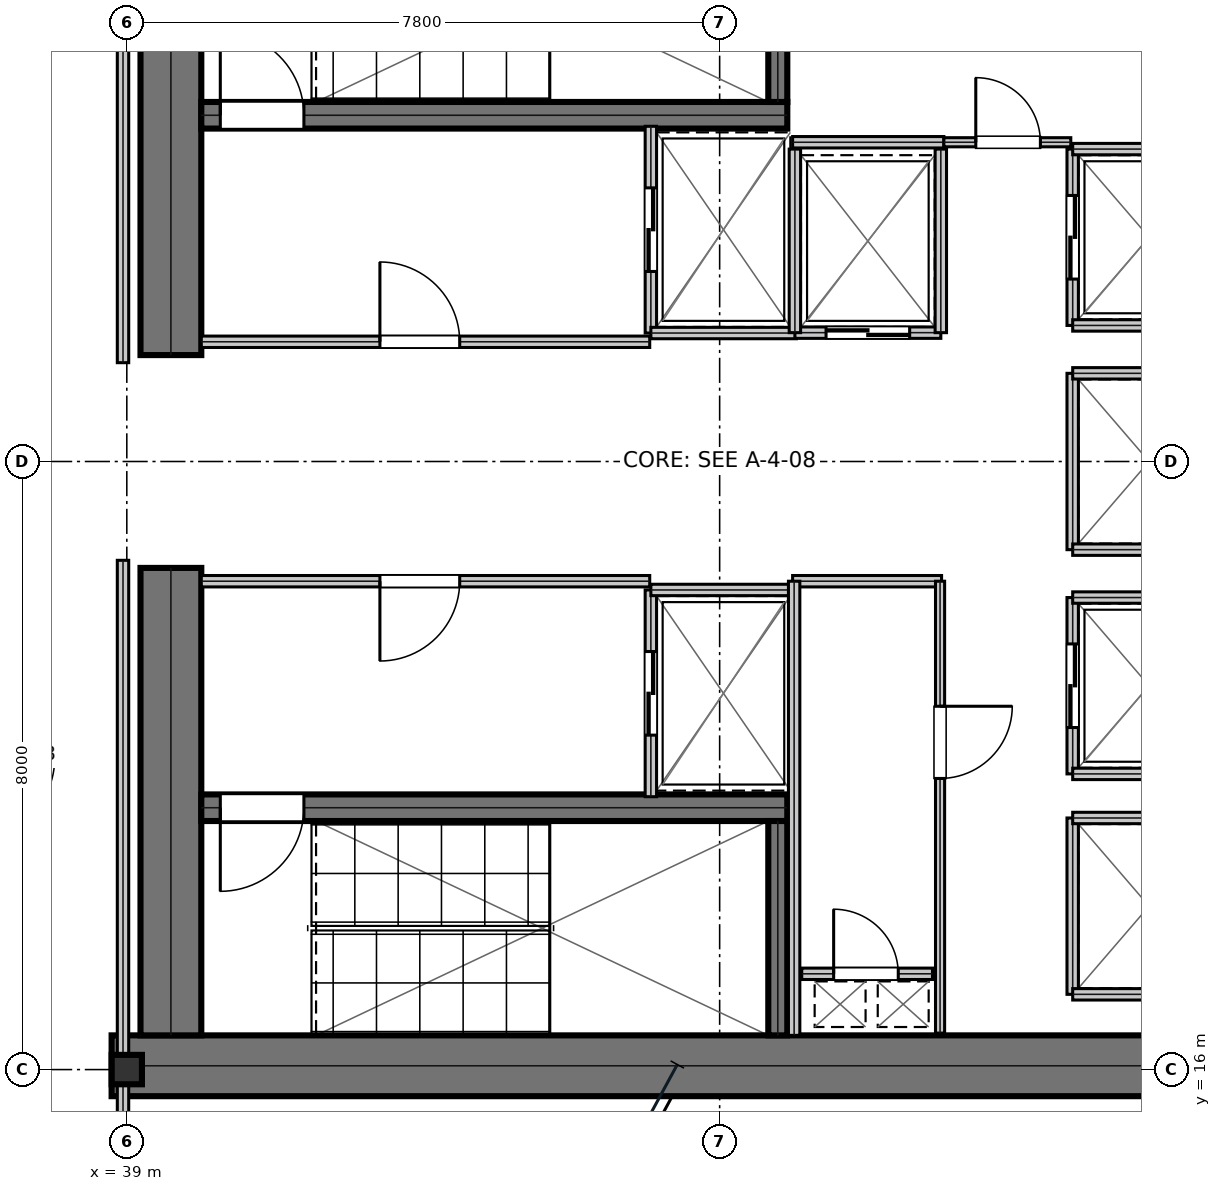
"""IFC4 building model, lengths in metres.
Left out: names, types, materials, properties, quantities, classifications, styles, units other than length and angle.
Written with IfcOpenShell. Run it as: python <this file> out.ifc"""

import sys

from ifc_helpers import new_model, si_unit, direction, frame, frame_2d, origin, origin_2d, place, context, subcontext, project, spatial, rectangle, i_section, extrude, element, fill, save


model = new_model("IFC4")
c1 = context("Model", 3, precision=1e-05, world=origin(), true_north=direction((0.0, 1.0)))
c2 = subcontext(c1, "Body", "Model", "MODEL_VIEW")
j1 = project(units=[si_unit("LENGTHUNIT", "METRE"), si_unit("PLANEANGLEUNIT", "RADIAN")], contexts=[c1])
p1 = place(None, origin())
s1 = spatial("IfcSite", under=j1, at=p1, CompositionType="ELEMENT")
p2 = place(p1, origin())
s2 = spatial("IfcBuilding", under=s1, at=p2, CompositionType="ELEMENT")
p3 = place(p2, frame((0.0, 0.0, 157.35)))
s3 = spatial("IfcBuildingStorey", under=s2, at=p3, CompositionType="ELEMENT", Elevation=157.35)
p4 = place(p3, frame((38.8, 16.05, 0.0), z_axis=(0.0, 0.0, 1.0), x_axis=(1.0, 0.0, 0.0)))
e1 = element("IfcWall", 1, at=p4, inside=s3, PredefinedType="SHEAR", context=c2, shape_type="SweptSolid", body=[
    extrude(rectangle(XDim=16.0, YDim=0.8, at=frame_2d((8.0, 0.0))), origin(), (0.0, 0.0, 1.0), 3.81),
])
for number, where, z_axis, x_axis in (
    (2, (39.58, 16.45, 0.0), (0.0, 0.0, 1.0), (0.0, 1.0, 0.0)),
    (3, (39.58, 25.4, 0.0), (0.0, 0.0, 1.0), (0.0, 1.0, 0.0)),
):
    element("IfcWall", number, at=place(p3, frame(where, z_axis=z_axis, x_axis=x_axis)), inside=s3, PredefinedType="SHEAR", context=c2, shape_type="SweptSolid", body=[
        extrude(rectangle(XDim=6.15, YDim=0.8, at=frame_2d((3.075, 0.0))), origin(), (0.0, 0.0, 1.0), 3.81),
    ])
p5 = place(p3, frame((39.98, 28.555, 0.0), z_axis=(0.0, 0.0, 1.0), x_axis=(1.0, 0.0, 0.0)))
e4 = element("IfcWall", 4, at=p5, inside=s3, PredefinedType="SHEAR", context=c2, shape_type="SweptSolid", body=[
    extrude(rectangle(XDim=7.71, YDim=0.35, at=frame_2d((3.855, 0.0))), origin(), (0.0, 0.0, 1.0), 3.81),
])
p6 = place(p5, frame((0.25, 0.0, 0.0)))
e5 = element("IfcOpeningElement", 5, at=p6, cuts=e4, PredefinedType="OPENING", context=c2, shape_type="SweptSolid", body=[
    extrude(rectangle(XDim=1.1, YDim=2.15, at=frame_2d((0.55, 1.075))), frame((0.0, 0.185, 0.0), z_axis=(0.0, -1.0, 0.0), x_axis=(1.0, 0.0, 0.0)), (0.0, 0.0, 1.0), 0.37),
])
p7 = place(p3, frame((39.98, 19.445, 0.0), z_axis=(0.0, 0.0, 1.0), x_axis=(1.0, 0.0, 0.0)))
e6 = element("IfcWall", 6, at=p7, inside=s3, PredefinedType="SHEAR", context=c2, shape_type="SweptSolid", body=[
    extrude(rectangle(XDim=7.71, YDim=0.35, at=frame_2d((3.855, 0.0))), origin(), (0.0, 0.0, 1.0), 3.81),
])
p8 = place(p7, frame((0.25, 0.0, 0.0)))
e7 = element("IfcOpeningElement", 7, at=p8, cuts=e6, PredefinedType="OPENING", context=c2, shape_type="SweptSolid", body=[
    extrude(rectangle(XDim=1.1, YDim=2.15, at=frame_2d((0.55, 1.075))), frame((0.0, 0.185, 0.0), z_axis=(0.0, -1.0, 0.0), x_axis=(1.0, 0.0, 0.0)), (0.0, 0.0, 1.0), 0.37),
])
for number, where, z_axis, x_axis in (
    (8, (47.565, 28.73, 0.0), (0.0, 0.0, 1.0), (0.0, 1.0, 0.0)),
    (9, (47.565, 16.45, 0.0), (0.0, 0.0, 1.0), (0.0, 1.0, 0.0)),
):
    element("IfcWall", number, at=place(p3, frame(where, z_axis=z_axis, x_axis=x_axis)), inside=s3, PredefinedType="SHEAR", context=c2, shape_type="SweptSolid", body=[
        extrude(rectangle(XDim=2.82, YDim=0.25, at=frame_2d((1.41, 0.0))), origin(), (0.0, 0.0, 1.0), 3.81),
    ])
p9 = place(p3, frame((39.0, 16.0, 0.0), z_axis=(0.0, 0.0, 1.0), x_axis=(1.0, 0.0, 0.0)))
e10 = element("IfcColumn", 10, at=p9, inside=s3, PredefinedType="COLUMN", context=c2, shape_type="SweptSolid", body=[
    extrude(i_section(OverallWidth=0.398, OverallDepth=0.387, WebThickness=0.021, FlangeThickness=0.033, at=origin_2d()), origin(), (0.0, 0.0, 1.0), 4.044),
])
p10 = place(p3, frame((39.98, 25.575, 0.0), z_axis=(0.0, 0.0, 1.0), x_axis=(1.0, 0.0, 0.0)))
e11 = element("IfcWall", 11, at=p10, inside=s3, PredefinedType="PARTITIONING", context=c2, shape_type="SweptSolid", body=[
    extrude(rectangle(XDim=5.9, YDim=0.15, at=frame_2d((2.95, 0.0))), origin(), (0.0, 0.0, 1.0), 3.81),
])
p11 = place(p10, frame((2.35, 0.0, 0.0)))
e12 = element("IfcOpeningElement", 12, at=p11, cuts=e11, PredefinedType="OPENING", context=c2, shape_type="SweptSolid", body=[
    extrude(rectangle(XDim=1.05, YDim=2.15, at=frame_2d((0.525, 1.075))), frame((0.0, 0.085, 0.0), z_axis=(0.0, -1.0, 0.0), x_axis=(1.0, 0.0, 0.0)), (0.0, 0.0, 1.0), 0.17),
])
p12 = place(p3, frame((39.98, 22.425, 0.0), z_axis=(0.0, 0.0, 1.0), x_axis=(1.0, 0.0, 0.0)))
e13 = element("IfcWall", 13, at=p12, inside=s3, PredefinedType="PARTITIONING", context=c2, shape_type="SweptSolid", body=[
    extrude(rectangle(XDim=5.9, YDim=0.15, at=frame_2d((2.95, 0.0))), origin(), (0.0, 0.0, 1.0), 3.81),
])
p13 = place(p12, frame((2.35, 0.0, 0.0)))
e14 = element("IfcOpeningElement", 14, at=p13, cuts=e13, PredefinedType="OPENING", context=c2, shape_type="SweptSolid", body=[
    extrude(rectangle(XDim=1.05, YDim=2.15, at=frame_2d((0.525, 1.075))), frame((0.0, 0.085, 0.0), z_axis=(0.0, -1.0, 0.0), x_axis=(1.0, 0.0, 0.0)), (0.0, 0.0, 1.0), 0.17),
])
p14 = place(p3, frame((45.895, 25.69, 0.0), z_axis=(0.0, 0.0, 1.0), x_axis=(0.0, 1.0, 0.0)))
e15 = element("IfcWall", 15, at=p14, inside=s3, PredefinedType="PARTITIONING", context=c2, shape_type="SweptSolid", body=[
    extrude(rectangle(XDim=2.72, YDim=0.15, at=frame_2d((1.36, 0.0))), origin(), (0.0, 0.0, 1.0), 3.81),
])
p15 = place(p14, frame((0.81, 0.0, 0.0)))
e16 = element("IfcOpeningElement", 16, at=p15, cuts=e15, PredefinedType="OPENING", context=c2, shape_type="SweptSolid", body=[
    extrude(rectangle(XDim=1.1, YDim=2.15, at=frame_2d((0.55, 1.075))), frame((0.0, 0.085, 0.0), z_axis=(0.0, -1.0, 0.0), x_axis=(1.0, 0.0, 0.0)), (0.0, 0.0, 1.0), 0.17),
])
p16 = place(p3, frame((45.895, 25.69, 0.0), z_axis=(0.0, 0.0, 1.0), x_axis=(1.0, 0.0, 0.0)))
e17 = element("IfcWall", 17, at=p16, inside=s3, PredefinedType="PARTITIONING", context=c2, shape_type="SweptSolid", body=[
    extrude(rectangle(XDim=1.915, YDim=0.15, at=frame_2d((0.958, 0.0))), origin(), (0.0, 0.0, 1.0), 3.81),
])
p17 = place(p3, frame((45.895, 19.59, 0.0), z_axis=(0.0, 0.0, 1.0), x_axis=(0.0, 1.0, 0.0)))
e18 = element("IfcWall", 18, at=p17, inside=s3, PredefinedType="PARTITIONING", context=c2, shape_type="SweptSolid", body=[
    extrude(rectangle(XDim=2.72, YDim=0.15, at=frame_2d((1.36, 0.0))), origin(), (0.0, 0.0, 1.0), 3.81),
])
p18 = place(p17, frame((0.81, 0.0, 0.0)))
e19 = element("IfcOpeningElement", 19, at=p18, cuts=e18, PredefinedType="OPENING", context=c2, shape_type="SweptSolid", body=[
    extrude(rectangle(XDim=1.1, YDim=2.15, at=frame_2d((0.55, 1.075))), frame((0.0, 0.085, 0.0), z_axis=(0.0, -1.0, 0.0), x_axis=(1.0, 0.0, 0.0)), (0.0, 0.0, 1.0), 0.17),
])
p19 = place(p3, frame((45.895, 22.31, 0.0), z_axis=(0.0, 0.0, 1.0), x_axis=(1.0, 0.0, 0.0)))
e20 = element("IfcWall", 20, at=p19, inside=s3, PredefinedType="PARTITIONING", context=c2, shape_type="SweptSolid", body=[
    extrude(rectangle(XDim=1.915, YDim=0.15, at=frame_2d((0.958, 0.0))), origin(), (0.0, 0.0, 1.0), 3.81),
])
p20 = place(p3, frame((47.79, 25.695, 0.0), z_axis=(0.0, 0.0, 1.0), x_axis=(1.0, 0.0, 0.0)))
e21 = element("IfcWall", 21, at=p20, inside=s3, PredefinedType="PARTITIONING", context=c2, shape_type="SweptSolid", body=[
    extrude(rectangle(XDim=1.92, YDim=0.15, at=frame_2d((0.96, 0.0))), origin(), (0.0, 0.0, 1.0), 3.81),
])
p21 = place(p20, frame((0.41, 0.0, 0.0)))
e22 = element("IfcOpeningElement", 22, at=p21, cuts=e21, PredefinedType="OPENING", context=c2, shape_type="SweptSolid", body=[
    extrude(rectangle(XDim=1.1, YDim=2.15, at=frame_2d((0.55, 1.075))), frame((0.0, 0.085, 0.0), z_axis=(0.0, -1.0, 0.0), x_axis=(1.0, 0.0, 0.0)), (0.0, 0.0, 1.0), 0.17),
])
for number, where, z_axis, x_axis in (
    (23, (47.79, 25.695, 0.0), (0.0, 0.0, 1.0), (0.0, 1.0, 0.0)),
    (24, (49.71, 25.695, 0.0), (0.0, 0.0, 1.0), (0.0, 1.0, 0.0)),
):
    element("IfcWall", number, at=place(p3, frame(where, z_axis=z_axis, x_axis=x_axis)), inside=s3, PredefinedType="PARTITIONING", context=c2, shape_type="SweptSolid", body=[
        extrude(rectangle(XDim=2.415, YDim=0.15, at=frame_2d((1.208, 0.0))), origin(), (0.0, 0.0, 1.0), 3.81),
    ])
p22 = place(p3, frame((51.445, 25.79, 0.0), z_axis=(0.0, 0.0, 1.0), x_axis=(0.0, 1.0, 0.0)))
e25 = element("IfcWall", 25, at=p22, inside=s3, PredefinedType="PARTITIONING", context=c2, shape_type="SweptSolid", body=[
    extrude(rectangle(XDim=2.32, YDim=0.15, at=frame_2d((1.16, 0.0))), origin(), (0.0, 0.0, 1.0), 3.81),
])
p23 = place(p22, frame((0.61, 0.0, 0.0)))
e26 = element("IfcOpeningElement", 26, at=p23, cuts=e25, PredefinedType="OPENING", context=c2, shape_type="SweptSolid", body=[
    extrude(rectangle(XDim=1.1, YDim=2.15, at=frame_2d((0.55, 1.075))), frame((0.0, 0.085, 0.0), z_axis=(0.0, -1.0, 0.0), x_axis=(1.0, 0.0, 0.0)), (0.0, 0.0, 1.0), 0.17),
])
for number, where, z_axis, x_axis in (
    (27, (51.445, 25.79, 0.0), (0.0, 0.0, 1.0), (1.0, 0.0, 0.0)),
    (28, (51.445, 28.11, 0.0), (0.0, 0.0, 1.0), (1.0, 0.0, 0.0)),
):
    element("IfcWall", number, at=place(p3, frame(where, z_axis=z_axis, x_axis=x_axis)), inside=s3, PredefinedType="PARTITIONING", context=c2, shape_type="SweptSolid", body=[
        extrude(rectangle(XDim=2.015, YDim=0.15, at=frame_2d((1.007, 0.0))), origin(), (0.0, 0.0, 1.0), 3.81),
    ])
p24 = place(p3, frame((51.445, 19.89, 0.0), z_axis=(0.0, 0.0, 1.0), x_axis=(0.0, 1.0, 0.0)))
e29 = element("IfcWall", 29, at=p24, inside=s3, PredefinedType="PARTITIONING", context=c2, shape_type="SweptSolid", body=[
    extrude(rectangle(XDim=2.32, YDim=0.15, at=frame_2d((1.16, 0.0))), origin(), (0.0, 0.0, 1.0), 3.81),
])
p25 = place(p24, frame((0.61, 0.0, 0.0)))
e30 = element("IfcOpeningElement", 30, at=p25, cuts=e29, PredefinedType="OPENING", context=c2, shape_type="SweptSolid", body=[
    extrude(rectangle(XDim=1.1, YDim=2.15, at=frame_2d((0.55, 1.075))), frame((0.0, 0.085, 0.0), z_axis=(0.0, -1.0, 0.0), x_axis=(1.0, 0.0, 0.0)), (0.0, 0.0, 1.0), 0.17),
])
for number, where, z_axis, x_axis in (
    (31, (51.445, 19.89, 0.0), (0.0, 0.0, 1.0), (1.0, 0.0, 0.0)),
    (32, (51.445, 22.21, 0.0), (0.0, 0.0, 1.0), (1.0, 0.0, 0.0)),
):
    element("IfcWall", number, at=place(p3, frame(where, z_axis=z_axis, x_axis=x_axis)), inside=s3, PredefinedType="PARTITIONING", context=c2, shape_type="SweptSolid", body=[
        extrude(rectangle(XDim=2.015, YDim=0.15, at=frame_2d((1.007, 0.0))), origin(), (0.0, 0.0, 1.0), 3.81),
    ])
p26 = place(p3, frame((51.445, 22.84, 0.0), z_axis=(0.0, 0.0, 1.0), x_axis=(0.0, 1.0, 0.0)))
e33 = element("IfcWall", 33, at=p26, inside=s3, PredefinedType="PARTITIONING", context=c2, shape_type="SweptSolid", body=[
    extrude(rectangle(XDim=2.32, YDim=0.15, at=frame_2d((1.16, 0.0))), origin(), (0.0, 0.0, 1.0), 3.81),
])
for number, where, z_axis, x_axis in (
    (34, (51.445, 22.84, 0.0), (0.0, 0.0, 1.0), (1.0, 0.0, 0.0)),
    (35, (51.445, 25.16, 0.0), (0.0, 0.0, 1.0), (1.0, 0.0, 0.0)),
):
    element("IfcWall", number, at=place(p3, frame(where, z_axis=z_axis, x_axis=x_axis)), inside=s3, PredefinedType="PARTITIONING", context=c2, shape_type="SweptSolid", body=[
        extrude(rectangle(XDim=2.015, YDim=0.15, at=frame_2d((1.007, 0.0))), origin(), (0.0, 0.0, 1.0), 3.81),
    ])
p27 = place(p3, frame((51.445, 16.99, 0.0), z_axis=(0.0, 0.0, 1.0), x_axis=(0.0, 1.0, 0.0)))
e36 = element("IfcWall", 36, at=p27, inside=s3, PredefinedType="PARTITIONING", context=c2, shape_type="SweptSolid", body=[
    extrude(rectangle(XDim=2.32, YDim=0.15, at=frame_2d((1.16, 0.0))), origin(), (0.0, 0.0, 1.0), 3.81),
])
for number, where, z_axis, x_axis in (
    (37, (51.445, 16.99, 0.0), (0.0, 0.0, 1.0), (1.0, 0.0, 0.0)),
    (38, (51.445, 19.31, 0.0), (0.0, 0.0, 1.0), (1.0, 0.0, 0.0)),
):
    element("IfcWall", number, at=place(p3, frame(where, z_axis=z_axis, x_axis=x_axis)), inside=s3, PredefinedType="PARTITIONING", context=c2, shape_type="SweptSolid", body=[
        extrude(rectangle(XDim=2.015, YDim=0.15, at=frame_2d((1.007, 0.0))), origin(), (0.0, 0.0, 1.0), 3.81),
    ])
p28 = place(p3, frame((47.88, 17.26, 0.0), z_axis=(0.0, 0.0, 1.0), x_axis=(1.0, 0.0, 0.0)))
e39 = element("IfcWall", 39, at=p28, inside=s3, PredefinedType="PARTITIONING", context=c2, shape_type="SweptSolid", body=[
    extrude(rectangle(XDim=1.72, YDim=0.15, at=frame_2d((0.86, 0.0))), origin(), (0.0, 0.0, 1.0), 3.81),
])
p29 = place(p28, frame((0.42, 0.0, 0.0)))
e40 = element("IfcOpeningElement", 40, at=p29, cuts=e39, PredefinedType="OPENING", context=c2, shape_type="SweptSolid", body=[
    extrude(rectangle(XDim=0.85, YDim=2.15, at=frame_2d((0.425, 1.075))), frame((0.0, 0.085, 0.0), z_axis=(0.0, -1.0, 0.0), x_axis=(1.0, 0.0, 0.0)), (0.0, 0.0, 1.0), 0.17),
])
p30 = place(p3, frame((47.76, 22.425, 0.0), z_axis=(0.0, 0.0, 1.0), x_axis=(1.0, 0.0, 0.0)))
e41 = element("IfcWall", 41, at=p30, inside=s3, PredefinedType="PARTITIONING", context=c2, shape_type="SweptSolid", body=[
    extrude(rectangle(XDim=1.96, YDim=0.15, at=frame_2d((0.98, 0.0))), origin(), (0.0, 0.0, 1.0), 3.81),
])
p31 = place(p3, frame((47.78, 16.45, 0.0), z_axis=(0.0, 0.0, 1.0), x_axis=(0.0, 1.0, 0.0)))
e42 = element("IfcWall", 42, at=p31, inside=s3, PredefinedType="PARTITIONING", context=c2, shape_type="SweptSolid", body=[
    extrude(rectangle(XDim=5.975, YDim=0.15, at=frame_2d((2.988, 0.0))), origin(), (0.0, 0.0, 1.0), 3.81),
])
p32 = place(p3, frame((49.7, 16.48, 0.0), z_axis=(0.0, 0.0, 1.0), x_axis=(0.0, 1.0, 0.0)))
e43 = element("IfcWall", 43, at=p32, inside=s3, PredefinedType="PARTITIONING", context=c2, shape_type="SweptSolid", body=[
    extrude(rectangle(XDim=5.945, YDim=0.12, at=frame_2d((2.973, 0.0))), origin(), (0.0, 0.0, 1.0), 3.81),
])
p33 = place(p32, frame((3.35, 0.0, 0.0)))
e44 = element("IfcOpeningElement", 44, at=p33, cuts=e43, PredefinedType="OPENING", context=c2, shape_type="SweptSolid", body=[
    extrude(rectangle(XDim=0.95, YDim=2.15, at=frame_2d((0.475, 1.075))), frame((0.0, 0.07, 0.0), z_axis=(0.0, -1.0, 0.0), x_axis=(1.0, 0.0, 0.0)), (0.0, 0.0, 1.0), 0.14),
])
p34 = place(p3, frame((47.76, 28.2, 0.0), z_axis=(0.0, 0.0, 1.0), x_axis=(1.0, 0.0, 0.0)))
e45 = element("IfcWall", 45, at=p34, inside=s3, PredefinedType="PARTITIONING", context=c2, shape_type="SweptSolid", body=[
    extrude(rectangle(XDim=1.99, YDim=0.15, at=frame_2d((0.995, 0.0))), origin(), (0.0, 0.0, 1.0), 3.81),
])
p35 = place(p3, frame((49.75, 28.2, 0.0), z_axis=(0.0, 0.0, 1.0), x_axis=(1.0, 0.0, 0.0)))
e46 = element("IfcWall", 46, at=p35, inside=s3, PredefinedType="PARTITIONING", context=c2, shape_type="SweptSolid", body=[
    extrude(rectangle(XDim=1.67, YDim=0.12, at=frame_2d((0.835, 0.0))), origin(), (0.0, 0.0, 1.0), 3.81),
])
p36 = place(p35, frame((0.42, 0.0, 0.0)))
e47 = element("IfcOpeningElement", 47, at=p36, cuts=e46, PredefinedType="OPENING", context=c2, shape_type="SweptSolid", body=[
    extrude(rectangle(XDim=0.85, YDim=2.15, at=frame_2d((0.425, 1.075))), frame((0.0, 0.07, 0.0), z_axis=(0.0, -1.0, 0.0), x_axis=(1.0, 0.0, 0.0)), (0.0, 0.0, 1.0), 0.14),
])
for number, where, z_axis, x_axis in (
    (48, (38.95, 14.5, 0.0), (0.0, 0.0, 1.0), (0.0, 1.0, 0.0)),
    (49, (38.95, 25.3, 0.0), (0.0, 0.0, 1.0), (0.0, 1.0, 0.0)),
):
    element("IfcWall", number, at=place(p3, frame(where, z_axis=z_axis, x_axis=x_axis)), inside=s3, PredefinedType="PARTITIONING", context=c2, shape_type="SweptSolid", body=[
        extrude(rectangle(XDim=8.2, YDim=0.15, at=frame_2d((4.1, 0.0))), origin(), (0.0, 0.0, 1.0), 3.19),
    ])
p37 = place(p11, origin())
e50 = element("IfcDoor", 50, at=p37, inside=s3, OperationType="SINGLE_SWING_LEFT", PredefinedType="DOOR", context=c2, shape_type="SweptSolid", body=[
    extrude(rectangle(XDim=1.05, YDim=2.15, at=frame_2d((0.525, 1.075))), frame((0.0, 0.025, 0.0), z_axis=(0.0, -1.0, 0.0), x_axis=(1.0, 0.0, 0.0)), (0.0, 0.0, 1.0), 0.05),
])
fill(e12, e50)
p38 = place(p13, frame((1.05, 0.0, 0.0), z_axis=(0.0, 0.0, 1.0), x_axis=(-1.0, 0.0, 0.0)))
e51 = element("IfcDoor", 51, at=p38, inside=s3, OperationType="SINGLE_SWING_RIGHT", PredefinedType="DOOR", context=c2, shape_type="SweptSolid", body=[
    extrude(rectangle(XDim=1.05, YDim=2.15, at=frame_2d((0.525, 1.075))), frame((0.0, 0.025, 0.0), z_axis=(0.0, -1.0, 0.0), x_axis=(1.0, 0.0, 0.0)), (0.0, 0.0, 1.0), 0.05),
])
fill(e14, e51)
p39 = place(p15, frame((1.1, 0.0, 0.0), z_axis=(0.0, 0.0, 1.0), x_axis=(-1.0, 0.0, 0.0)))
e52 = element("IfcDoor", 52, at=p39, inside=s3, OperationType="DOUBLE_DOOR_SLIDING", PredefinedType="DOOR", context=c2, shape_type="SweptSolid", body=[
    extrude(rectangle(XDim=1.1, YDim=2.15, at=frame_2d((0.55, 1.075))), frame((0.0, 0.025, 0.0), z_axis=(0.0, -1.0, 0.0), x_axis=(1.0, 0.0, 0.0)), (0.0, 0.0, 1.0), 0.05),
])
fill(e16, e52)
p40 = place(p18, frame((1.1, 0.0, 0.0), z_axis=(0.0, 0.0, 1.0), x_axis=(-1.0, 0.0, 0.0)))
e53 = element("IfcDoor", 53, at=p40, inside=s3, OperationType="DOUBLE_DOOR_SLIDING", PredefinedType="DOOR", context=c2, shape_type="SweptSolid", body=[
    extrude(rectangle(XDim=1.1, YDim=2.15, at=frame_2d((0.55, 1.075))), frame((0.0, 0.025, 0.0), z_axis=(0.0, -1.0, 0.0), x_axis=(1.0, 0.0, 0.0)), (0.0, 0.0, 1.0), 0.05),
])
fill(e19, e53)
p41 = place(p21, frame((1.1, 0.0, 0.0), z_axis=(0.0, 0.0, 1.0), x_axis=(-1.0, 0.0, 0.0)))
e54 = element("IfcDoor", 54, at=p41, inside=s3, OperationType="DOUBLE_DOOR_SLIDING", PredefinedType="DOOR", context=c2, shape_type="SweptSolid", body=[
    extrude(rectangle(XDim=1.1, YDim=2.15, at=frame_2d((0.55, 1.075))), frame((0.0, 0.025, 0.0), z_axis=(0.0, -1.0, 0.0), x_axis=(1.0, 0.0, 0.0)), (0.0, 0.0, 1.0), 0.05),
])
fill(e22, e54)
p42 = place(p23, frame((1.1, 0.0, 0.0), z_axis=(0.0, 0.0, 1.0), x_axis=(-1.0, 0.0, 0.0)))
e55 = element("IfcDoor", 55, at=p42, inside=s3, OperationType="DOUBLE_DOOR_SLIDING", PredefinedType="DOOR", context=c2, shape_type="SweptSolid", body=[
    extrude(rectangle(XDim=1.1, YDim=2.15, at=frame_2d((0.55, 1.075))), frame((0.0, 0.025, 0.0), z_axis=(0.0, -1.0, 0.0), x_axis=(1.0, 0.0, 0.0)), (0.0, 0.0, 1.0), 0.05),
])
fill(e26, e55)
p43 = place(p25, frame((1.1, 0.0, 0.0), z_axis=(0.0, 0.0, 1.0), x_axis=(-1.0, 0.0, 0.0)))
e56 = element("IfcDoor", 56, at=p43, inside=s3, OperationType="DOUBLE_DOOR_SLIDING", PredefinedType="DOOR", context=c2, shape_type="SweptSolid", body=[
    extrude(rectangle(XDim=1.1, YDim=2.15, at=frame_2d((0.55, 1.075))), frame((0.0, 0.025, 0.0), z_axis=(0.0, -1.0, 0.0), x_axis=(1.0, 0.0, 0.0)), (0.0, 0.0, 1.0), 0.05),
])
fill(e30, e56)
p44 = place(p29, origin())
e57 = element("IfcDoor", 57, at=p44, inside=s3, OperationType="SINGLE_SWING_LEFT", PredefinedType="TRAPDOOR", context=c2, shape_type="SweptSolid", body=[
    extrude(rectangle(XDim=0.85, YDim=2.15, at=frame_2d((0.425, 1.075))), frame((0.0, 0.025, 0.0), z_axis=(0.0, -1.0, 0.0), x_axis=(1.0, 0.0, 0.0)), (0.0, 0.0, 1.0), 0.05),
])
fill(e40, e57)
p45 = place(p33, frame((0.95, 0.0, 0.0), z_axis=(0.0, 0.0, 1.0), x_axis=(-1.0, 0.0, 0.0)))
e58 = element("IfcDoor", 58, at=p45, inside=s3, OperationType="SINGLE_SWING_LEFT", PredefinedType="DOOR", context=c2, shape_type="SweptSolid", body=[
    extrude(rectangle(XDim=0.95, YDim=2.15, at=frame_2d((0.475, 1.075))), frame((0.0, 0.025, 0.0), z_axis=(0.0, -1.0, 0.0), x_axis=(1.0, 0.0, 0.0)), (0.0, 0.0, 1.0), 0.05),
])
fill(e44, e58)
p46 = place(p36, origin())
e59 = element("IfcDoor", 59, at=p46, inside=s3, OperationType="SINGLE_SWING_LEFT", PredefinedType="DOOR", context=c2, shape_type="SweptSolid", body=[
    extrude(rectangle(XDim=0.85, YDim=2.15, at=frame_2d((0.425, 1.075))), frame((0.0, 0.025, 0.0), z_axis=(0.0, -1.0, 0.0), x_axis=(1.0, 0.0, 0.0)), (0.0, 0.0, 1.0), 0.05),
])
fill(e47, e59)
p47 = place(p6, origin())
e60 = element("IfcDoor", 60, at=p47, inside=s3, OperationType="SINGLE_SWING_LEFT", PredefinedType="DOOR", context=c2, shape_type="SweptSolid", body=[
    extrude(rectangle(XDim=1.1, YDim=2.15, at=frame_2d((0.55, 1.075))), frame((0.0, 0.025, 0.0), z_axis=(0.0, -1.0, 0.0), x_axis=(1.0, 0.0, 0.0)), (0.0, 0.0, 1.0), 0.05),
])
fill(e5, e60)
p48 = place(p8, frame((1.1, 0.0, 0.0), z_axis=(0.0, 0.0, 1.0), x_axis=(-1.0, 0.0, 0.0)))
e61 = element("IfcDoor", 61, at=p48, inside=s3, OperationType="SINGLE_SWING_RIGHT", PredefinedType="DOOR", context=c2, shape_type="SweptSolid", body=[
    extrude(rectangle(XDim=1.1, YDim=2.15, at=frame_2d((0.55, 1.075))), frame((0.0, 0.025, 0.0), z_axis=(0.0, -1.0, 0.0), x_axis=(1.0, 0.0, 0.0)), (0.0, 0.0, 1.0), 0.05),
])
fill(e7, e61)
save(model, sys.argv[1])
